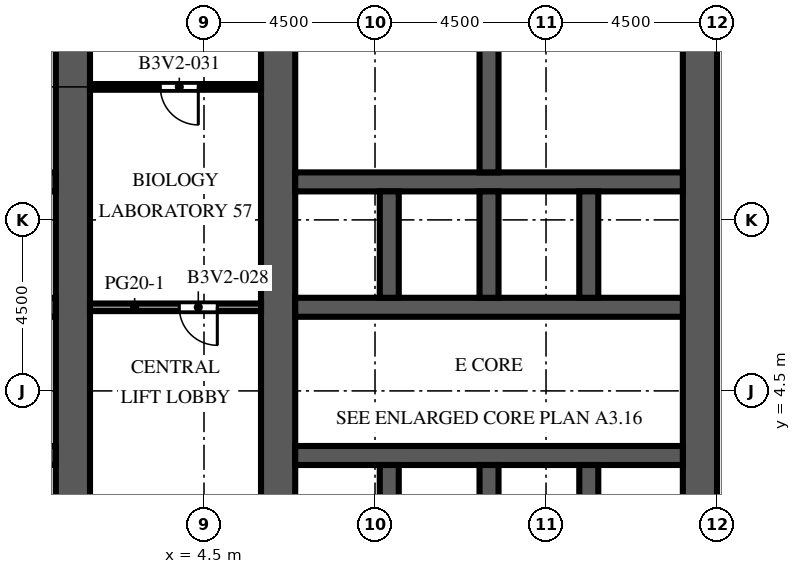
"""IFC4 building model, lengths in metres.
Left out: names, types, materials, properties, quantities, classifications, styles, units other than length and angle.
Written with IfcOpenShell. Run it as: python <this file> out.ifc"""

import sys

from ifc_helpers import new_model, si_unit, direction, frame, frame_2d, origin, place, context, subcontext, project, spatial, rectangle, extrude, element, fill, save


model = new_model("IFC4")
c1 = context("Model", 3, precision=1e-05, world=origin(), true_north=direction((0.0, 1.0)))
c2 = subcontext(c1, "Body", "Model", "MODEL_VIEW")
j1 = project(units=[si_unit("LENGTHUNIT", "METRE"), si_unit("PLANEANGLEUNIT", "RADIAN")], contexts=[c1])
p1 = place(None, origin())
s1 = spatial("IfcSite", under=j1, at=p1, CompositionType="ELEMENT")
p2 = place(p1, origin())
s2 = spatial("IfcBuilding", under=s1, at=p2, CompositionType="ELEMENT")
p3 = place(p2, frame((0.0, 0.0, 102.5)))
s3 = spatial("IfcBuildingStorey", under=s2, at=p3, CompositionType="ELEMENT", Elevation=102.5)
p4 = place(p3, frame((1.05, -9.0, 0.0), z_axis=(0.0, 0.0, 1.0), x_axis=(0.0, 1.0, 0.0)))
e1 = element("IfcWall", 1, at=p4, inside=s3, PredefinedType="SHEAR", context=c2, shape_type="SweptSolid", body=[
    extrude(rectangle(XDim=27.5, YDim=0.9, at=frame_2d((13.75, 0.0))), origin(), (0.0, 0.0, 1.0), 4.1),
])
p5 = place(p4, frame((12.55, 0.0, 0.0)))
e2 = element("IfcOpeningElement", 2, at=p5, cuts=e1, PredefinedType="OPENING", context=c2, shape_type="SweptSolid", body=[
    extrude(rectangle(XDim=2.4, YDim=2.4, at=frame_2d((1.2, 1.2))), frame((0.0, 0.46, 0.0), z_axis=(0.0, -1.0, 0.0), x_axis=(1.0, 0.0, 0.0)), (0.0, 0.0, 1.0), 0.92),
])
p6 = place(p4, frame((3.893, 0.0, 0.0)))
e3 = element("IfcOpeningElement", 3, at=p6, cuts=e1, PredefinedType="OPENING", context=c2, shape_type="SweptSolid", body=[
    extrude(rectangle(XDim=0.923, YDim=2.1, at=frame_2d((0.461, 1.05))), frame((0.0, 0.46, 0.0), z_axis=(0.0, -1.0, 0.0), x_axis=(1.0, 0.0, 0.0)), (0.0, 0.0, 1.0), 0.92),
])
p7 = place(p4, frame((23.427, 0.0, 0.0)))
e4 = element("IfcOpeningElement", 4, at=p7, cuts=e1, PredefinedType="OPENING", context=c2, shape_type="SweptSolid", body=[
    extrude(rectangle(XDim=1.2, YDim=2.1, at=frame_2d((0.6, 1.05))), frame((0.0, 0.46, 0.0), z_axis=(0.0, -1.0, 0.0), x_axis=(1.0, 0.0, 0.0)), (0.0, 0.0, 1.0), 0.92),
])
p8 = place(p3, frame((-9.6, 2.8, 0.0), z_axis=(0.0, 0.0, 1.0), x_axis=(1.0, 0.0, 0.0)))
e5 = element("IfcWall", 5, at=p8, inside=s3, PredefinedType="SHEAR", context=c2, shape_type="SweptSolid", body=[
    extrude(rectangle(XDim=10.2, YDim=0.5, at=frame_2d((5.1, 0.0))), origin(), (0.0, 0.0, 1.0), 4.1),
])
p9 = place(p8, frame((0.562, 0.0, 0.0)))
e6 = element("IfcOpeningElement", 6, at=p9, cuts=e5, PredefinedType="OPENING", context=c2, shape_type="SweptSolid", body=[
    extrude(rectangle(XDim=1.1, YDim=2.1, at=frame_2d((0.55, 1.05))), frame((0.0, 0.26, 0.0), z_axis=(0.0, -1.0, 0.0), x_axis=(1.0, 0.0, 0.0)), (0.0, 0.0, 1.0), 0.52),
])
p10 = place(p8, frame((3.238, 0.0, 0.0)))
e7 = element("IfcOpeningElement", 7, at=p10, cuts=e5, PredefinedType="OPENING", context=c2, shape_type="SweptSolid", body=[
    extrude(rectangle(XDim=1.1, YDim=2.1, at=frame_2d((0.55, 1.05))), frame((0.0, 0.26, 0.0), z_axis=(0.0, -1.0, 0.0), x_axis=(1.0, 0.0, 0.0)), (0.0, 0.0, 1.0), 0.52),
])
p11 = place(p8, frame((8.538, 0.0, 0.0)))
e8 = element("IfcOpeningElement", 8, at=p11, cuts=e5, PredefinedType="OPENING", context=c2, shape_type="SweptSolid", body=[
    extrude(rectangle(XDim=1.1, YDim=2.1, at=frame_2d((0.55, 1.05))), frame((0.0, 0.26, 0.0), z_axis=(0.0, -1.0, 0.0), x_axis=(1.0, 0.0, 0.0)), (0.0, 0.0, 1.0), 0.52),
])
p12 = place(p3, frame((-9.6, 6.7, 0.0), z_axis=(0.0, 0.0, 1.0), x_axis=(1.0, 0.0, 0.0)))
e9 = element("IfcWall", 9, at=p12, inside=s3, PredefinedType="SHEAR", context=c2, shape_type="SweptSolid", body=[
    extrude(rectangle(XDim=10.2, YDim=0.5, at=frame_2d((5.1, 0.0))), origin(), (0.0, 0.0, 1.0), 4.1),
])
p13 = place(p12, frame((0.562, 0.0, 0.0)))
e10 = element("IfcOpeningElement", 10, at=p13, cuts=e9, PredefinedType="OPENING", context=c2, shape_type="SweptSolid", body=[
    extrude(rectangle(XDim=1.1, YDim=2.1, at=frame_2d((0.55, 1.05))), frame((0.0, 0.26, 0.0), z_axis=(0.0, -1.0, 0.0), x_axis=(1.0, 0.0, 0.0)), (0.0, 0.0, 1.0), 0.52),
])
p14 = place(p12, frame((3.288, 0.0, 0.0)))
e11 = element("IfcOpeningElement", 11, at=p14, cuts=e9, PredefinedType="OPENING", context=c2, shape_type="SweptSolid", body=[
    extrude(rectangle(XDim=1.0, YDim=2.1, at=frame_2d((0.5, 1.05))), frame((0.0, 0.26, 0.0), z_axis=(0.0, -1.0, 0.0), x_axis=(1.0, 0.0, 0.0)), (0.0, 0.0, 1.0), 0.52),
])
p15 = place(p12, frame((5.913, 0.0, 0.0)))
e12 = element("IfcOpeningElement", 12, at=p15, cuts=e9, PredefinedType="OPENING", context=c2, shape_type="SweptSolid", body=[
    extrude(rectangle(XDim=1.0, YDim=2.1, at=frame_2d((0.5, 1.05))), frame((0.0, 0.26, 0.0), z_axis=(0.0, -1.0, 0.0), x_axis=(1.0, 0.0, 0.0)), (0.0, 0.0, 1.0), 0.52),
])
p16 = place(p12, frame((8.587, 0.0, 0.0)))
e13 = element("IfcOpeningElement", 13, at=p16, cuts=e9, PredefinedType="OPENING", context=c2, shape_type="SweptSolid", body=[
    extrude(rectangle(XDim=1.0, YDim=2.1, at=frame_2d((0.5, 1.05))), frame((0.0, 0.26, 0.0), z_axis=(0.0, -1.0, 0.0), x_axis=(1.0, 0.0, 0.0)), (0.0, 0.0, 1.0), 0.52),
])
p17 = place(p3, frame((-9.6, 10.0, 0.0), z_axis=(0.0, 0.0, 1.0), x_axis=(1.0, 0.0, 0.0)))
e14 = element("IfcWall", 14, at=p17, inside=s3, PredefinedType="SHEAR", context=c2, shape_type="SweptSolid", body=[
    extrude(rectangle(XDim=10.2, YDim=0.5, at=frame_2d((5.1, 0.0))), origin(), (0.0, 0.0, 1.0), 4.1),
])
p18 = place(p3, frame((6.45, -9.0, 0.0), z_axis=(0.0, 0.0, 1.0), x_axis=(0.0, 1.0, 0.0)))
e15 = element("IfcWall", 15, at=p18, inside=s3, PredefinedType="SHEAR", context=c2, shape_type="SweptSolid", body=[
    extrude(rectangle(XDim=27.5, YDim=0.9, at=frame_2d((13.75, 0.0))), origin(), (0.0, 0.0, 1.0), 4.1),
])
p19 = place(p18, frame((12.55, 0.0, 0.0)))
e16 = element("IfcOpeningElement", 16, at=p19, cuts=e15, PredefinedType="OPENING", context=c2, shape_type="SweptSolid", body=[
    extrude(rectangle(XDim=2.4, YDim=2.4, at=frame_2d((1.2, 1.2))), frame((0.0, 0.46, 0.0), z_axis=(0.0, -1.0, 0.0), x_axis=(1.0, 0.0, 0.0)), (0.0, 0.0, 1.0), 0.92),
])
p20 = place(p18, frame((3.893, 0.0, 0.0)))
e17 = element("IfcOpeningElement", 17, at=p20, cuts=e15, PredefinedType="OPENING", context=c2, shape_type="SweptSolid", body=[
    extrude(rectangle(XDim=0.923, YDim=2.1, at=frame_2d((0.461, 1.05))), frame((0.0, 0.46, 0.0), z_axis=(0.0, -1.0, 0.0), x_axis=(1.0, 0.0, 0.0)), (0.0, 0.0, 1.0), 0.92),
])
p21 = place(p18, frame((23.427, 0.0, 0.0)))
e18 = element("IfcOpeningElement", 18, at=p21, cuts=e15, PredefinedType="OPENING", context=c2, shape_type="SweptSolid", body=[
    extrude(rectangle(XDim=1.2, YDim=2.1, at=frame_2d((0.6, 1.05))), frame((0.0, 0.46, 0.0), z_axis=(0.0, -1.0, 0.0), x_axis=(1.0, 0.0, 0.0)), (0.0, 0.0, 1.0), 0.92),
])
p22 = place(p3, frame((17.55, -9.0, 0.0), z_axis=(0.0, 0.0, 1.0), x_axis=(0.0, 1.0, 0.0)))
e19 = element("IfcWall", 19, at=p22, inside=s3, PredefinedType="SHEAR", context=c2, shape_type="SweptSolid", body=[
    extrude(rectangle(XDim=27.5, YDim=0.9, at=frame_2d((13.75, 0.0))), origin(), (0.0, 0.0, 1.0), 4.1),
])
p23 = place(p22, frame((12.55, 0.0, 0.0)))
e20 = element("IfcOpeningElement", 20, at=p23, cuts=e19, PredefinedType="OPENING", context=c2, shape_type="SweptSolid", body=[
    extrude(rectangle(XDim=2.4, YDim=2.4, at=frame_2d((1.2, 1.2))), frame((0.0, 0.46, 0.0), z_axis=(0.0, -1.0, 0.0), x_axis=(1.0, 0.0, 0.0)), (0.0, 0.0, 1.0), 0.92),
])
p24 = place(p22, frame((6.825, 0.0, 0.0)))
e21 = element("IfcOpeningElement", 21, at=p24, cuts=e19, PredefinedType="OPENING", context=c2, shape_type="SweptSolid", body=[
    extrude(rectangle(XDim=1.2, YDim=2.1, at=frame_2d((0.6, 1.05))), frame((0.0, 0.46, 0.0), z_axis=(0.0, -1.0, 0.0), x_axis=(1.0, 0.0, 0.0)), (0.0, 0.0, 1.0), 0.92),
])
p25 = place(p22, frame((19.475, 0.0, 0.0)))
e22 = element("IfcOpeningElement", 22, at=p25, cuts=e19, PredefinedType="OPENING", context=c2, shape_type="SweptSolid", body=[
    extrude(rectangle(XDim=1.2, YDim=2.1, at=frame_2d((0.6, 1.05))), frame((0.0, 0.46, 0.0), z_axis=(0.0, -1.0, 0.0), x_axis=(1.0, 0.0, 0.0)), (0.0, 0.0, 1.0), 0.92),
])
p26 = place(p3, frame((6.9, 2.8, 0.0), z_axis=(0.0, 0.0, 1.0), x_axis=(1.0, 0.0, 0.0)))
e23 = element("IfcWall", 23, at=p26, inside=s3, PredefinedType="SHEAR", context=c2, shape_type="SweptSolid", body=[
    extrude(rectangle(XDim=10.2, YDim=0.5, at=frame_2d((5.1, 0.0))), origin(), (0.0, 0.0, 1.0), 4.1),
])
p27 = place(p26, frame((0.562, 0.0, 0.0)))
e24 = element("IfcOpeningElement", 24, at=p27, cuts=e23, PredefinedType="OPENING", context=c2, shape_type="SweptSolid", body=[
    extrude(rectangle(XDim=1.1, YDim=2.1, at=frame_2d((0.55, 1.05))), frame((0.0, 0.26, 0.0), z_axis=(0.0, -1.0, 0.0), x_axis=(1.0, 0.0, 0.0)), (0.0, 0.0, 1.0), 0.52),
])
p28 = place(p26, frame((3.238, 0.0, 0.0)))
e25 = element("IfcOpeningElement", 25, at=p28, cuts=e23, PredefinedType="OPENING", context=c2, shape_type="SweptSolid", body=[
    extrude(rectangle(XDim=1.1, YDim=2.1, at=frame_2d((0.55, 1.05))), frame((0.0, 0.26, 0.0), z_axis=(0.0, -1.0, 0.0), x_axis=(1.0, 0.0, 0.0)), (0.0, 0.0, 1.0), 0.52),
])
p29 = place(p26, frame((8.538, 0.0, 0.0)))
e26 = element("IfcOpeningElement", 26, at=p29, cuts=e23, PredefinedType="OPENING", context=c2, shape_type="SweptSolid", body=[
    extrude(rectangle(XDim=1.1, YDim=2.1, at=frame_2d((0.55, 1.05))), frame((0.0, 0.26, 0.0), z_axis=(0.0, -1.0, 0.0), x_axis=(1.0, 0.0, 0.0)), (0.0, 0.0, 1.0), 0.52),
])
p30 = place(p3, frame((6.9, 6.7, 0.0), z_axis=(0.0, 0.0, 1.0), x_axis=(1.0, 0.0, 0.0)))
e27 = element("IfcWall", 27, at=p30, inside=s3, PredefinedType="SHEAR", context=c2, shape_type="SweptSolid", body=[
    extrude(rectangle(XDim=10.2, YDim=0.5, at=frame_2d((5.1, 0.0))), origin(), (0.0, 0.0, 1.0), 4.1),
])
p31 = place(p30, frame((0.562, 0.0, 0.0)))
e28 = element("IfcOpeningElement", 28, at=p31, cuts=e27, PredefinedType="OPENING", context=c2, shape_type="SweptSolid", body=[
    extrude(rectangle(XDim=1.1, YDim=2.1, at=frame_2d((0.55, 1.05))), frame((0.0, 0.26, 0.0), z_axis=(0.0, -1.0, 0.0), x_axis=(1.0, 0.0, 0.0)), (0.0, 0.0, 1.0), 0.52),
])
p32 = place(p30, frame((3.288, 0.0, 0.0)))
e29 = element("IfcOpeningElement", 29, at=p32, cuts=e27, PredefinedType="OPENING", context=c2, shape_type="SweptSolid", body=[
    extrude(rectangle(XDim=1.0, YDim=2.1, at=frame_2d((0.5, 1.05))), frame((0.0, 0.26, 0.0), z_axis=(0.0, -1.0, 0.0), x_axis=(1.0, 0.0, 0.0)), (0.0, 0.0, 1.0), 0.52),
])
p33 = place(p30, frame((5.913, 0.0, 0.0)))
e30 = element("IfcOpeningElement", 30, at=p33, cuts=e27, PredefinedType="OPENING", context=c2, shape_type="SweptSolid", body=[
    extrude(rectangle(XDim=1.0, YDim=2.1, at=frame_2d((0.5, 1.05))), frame((0.0, 0.26, 0.0), z_axis=(0.0, -1.0, 0.0), x_axis=(1.0, 0.0, 0.0)), (0.0, 0.0, 1.0), 0.52),
])
p34 = place(p30, frame((8.587, 0.0, 0.0)))
e31 = element("IfcOpeningElement", 31, at=p34, cuts=e27, PredefinedType="OPENING", context=c2, shape_type="SweptSolid", body=[
    extrude(rectangle(XDim=1.0, YDim=2.1, at=frame_2d((0.5, 1.05))), frame((0.0, 0.26, 0.0), z_axis=(0.0, -1.0, 0.0), x_axis=(1.0, 0.0, 0.0)), (0.0, 0.0, 1.0), 0.52),
])
p35 = place(p3, frame((6.9, 10.0, 0.0), z_axis=(0.0, 0.0, 1.0), x_axis=(1.0, 0.0, 0.0)))
e32 = element("IfcWall", 32, at=p35, inside=s3, PredefinedType="SHEAR", context=c2, shape_type="SweptSolid", body=[
    extrude(rectangle(XDim=10.2, YDim=0.5, at=frame_2d((5.1, 0.0))), origin(), (0.0, 0.0, 1.0), 4.1),
])
for number, where, z_axis, x_axis in (
    (33, (9.375, -0.25, 0.0), (0.0, 0.0, 1.0), (0.0, 1.0, 0.0)),
    (34, (9.375, 6.95, 0.0), (0.0, 0.0, 1.0), (0.0, 1.0, 0.0)),
    (35, (12.0, -0.25, 0.0), (0.0, 0.0, 1.0), (0.0, 1.0, 0.0)),
    (36, (12.0, 6.95, 0.0), (0.0, 0.0, 1.0), (0.0, 1.0, 0.0)),
    (37, (14.625, -0.25, 0.0), (0.0, 0.0, 1.0), (0.0, 1.0, 0.0)),
    (38, (14.625, 6.95, 0.0), (0.0, 0.0, 1.0), (0.0, 1.0, 0.0)),
):
    element("IfcWall", number, at=place(p3, frame(where, z_axis=z_axis, x_axis=x_axis)), inside=s3, PredefinedType="SHEAR", context=c2, shape_type="SweptSolid", body=[
        extrude(rectangle(XDim=2.8, YDim=0.5, at=frame_2d((1.4, 0.0))), origin(), (0.0, 0.0, 1.0), 4.1),
    ])
p36 = place(p3, frame((12.0, 10.25, 0.0), z_axis=(0.0, 0.0, 1.0), x_axis=(0.0, 1.0, 0.0)))
e39 = element("IfcWall", 39, at=p36, inside=s3, PredefinedType="SHEAR", context=c2, shape_type="SweptSolid", body=[
    extrude(rectangle(XDim=7.35, YDim=0.5, at=frame_2d((3.675, 0.0))), origin(), (0.0, 0.0, 1.0), 4.1),
])
p37 = place(p3, frame((-0.7, 12.455, 0.0), z_axis=(0.0, 0.0, 1.0), x_axis=(1.0, 0.0, 0.0)))
e40 = element("IfcWall", 40, at=p37, inside=s3, PredefinedType="PARTITIONING", context=c2, shape_type="SweptSolid", body=[
    extrude(rectangle(XDim=1.3, YDim=0.1, at=frame_2d((0.65, 0.0))), origin(), (0.0, 0.0, 1.0), 3.65),
])
p38 = place(p37, frame((0.2, 0.0, 0.0)))
e41 = element("IfcOpeningElement", 41, at=p38, cuts=e40, PredefinedType="OPENING", context=c2, shape_type="SweptSolid", body=[
    extrude(rectangle(XDim=0.9, YDim=2.1, at=frame_2d((0.45, 1.05))), frame((0.0, 0.06, 0.0), z_axis=(0.0, -1.0, 0.0), x_axis=(1.0, 0.0, 0.0)), (0.0, 0.0, 1.0), 0.12),
])
p39 = place(p3, frame((6.9, 12.455, 0.0), z_axis=(0.0, 0.0, 1.0), x_axis=(1.0, 0.0, 0.0)))
e42 = element("IfcWall", 42, at=p39, inside=s3, PredefinedType="PARTITIONING", context=c2, shape_type="SweptSolid", body=[
    extrude(rectangle(XDim=1.3, YDim=0.1, at=frame_2d((0.65, 0.0))), origin(), (0.0, 0.0, 1.0), 3.65),
])
p40 = place(p39, frame((0.2, 0.0, 0.0)))
e43 = element("IfcOpeningElement", 43, at=p40, cuts=e42, PredefinedType="OPENING", context=c2, shape_type="SweptSolid", body=[
    extrude(rectangle(XDim=0.9, YDim=2.1, at=frame_2d((0.45, 1.05))), frame((0.0, 0.06, 0.0), z_axis=(0.0, -1.0, 0.0), x_axis=(1.0, 0.0, 0.0)), (0.0, 0.0, 1.0), 0.12),
])
p41 = place(p3, frame((8.2, 12.455, 0.0), z_axis=(0.0, 0.0, 1.0), x_axis=(1.0, 0.0, 0.0)))
e44 = element("IfcWall", 44, at=p41, inside=s3, PredefinedType="PARTITIONING", context=c2, shape_type="SweptSolid", body=[
    extrude(rectangle(XDim=3.55, YDim=0.1, at=frame_2d((1.775, 0.0))), origin(), (0.0, 0.0, 1.0), 3.65),
])
p42 = place(p3, frame((8.2, 12.455, 0.0), z_axis=(0.0, 0.0, 1.0), x_axis=(0.0, 1.0, 0.0)))
e45 = element("IfcWall", 45, at=p42, inside=s3, PredefinedType="PARTITIONING", context=c2, shape_type="SweptSolid", body=[
    extrude(rectangle(XDim=2.573, YDim=0.1, at=frame_2d((1.286, 0.0))), origin(), (0.0, 0.0, 1.0), 3.65),
])
p43 = place(p42, frame((0.786, 0.0, 0.0)))
e46 = element("IfcOpeningElement", 46, at=p43, cuts=e45, PredefinedType="OPENING", context=c2, shape_type="SweptSolid", body=[
    extrude(rectangle(XDim=1.0, YDim=2.1, at=frame_2d((0.5, 1.05))), frame((0.0, 0.06, 0.0), z_axis=(0.0, -1.0, 0.0), x_axis=(1.0, 0.0, 0.0)), (0.0, 0.0, 1.0), 0.12),
])
p44 = place(p3, frame((1.5, 6.7, 0.0), z_axis=(0.0, 0.0, 1.0), x_axis=(1.0, 0.0, 0.0)))
e47 = element("IfcWall", 47, at=p44, inside=s3, PredefinedType="PARTITIONING", context=c2, shape_type="SweptSolid", body=[
    extrude(rectangle(XDim=4.5, YDim=0.2, at=frame_2d((2.25, 0.0))), origin(), (0.0, 0.0, 1.0), 3.65),
])
p45 = place(p44, frame((2.35, 0.0, 0.0)))
e48 = element("IfcOpeningElement", 48, at=p45, cuts=e47, PredefinedType="OPENING", context=c2, shape_type="SweptSolid", body=[
    extrude(rectangle(XDim=1.0, YDim=2.1, at=frame_2d((0.5, 1.05))), frame((0.0, 0.11, 0.0), z_axis=(0.0, -1.0, 0.0), x_axis=(1.0, 0.0, 0.0)), (0.0, 0.0, 1.0), 0.22),
])
p46 = place(p3, frame((1.5, 12.5, 0.0), z_axis=(0.0, 0.0, 1.0), x_axis=(1.0, 0.0, 0.0)))
e49 = element("IfcWall", 49, at=p46, inside=s3, PredefinedType="PARTITIONING", context=c2, shape_type="SweptSolid", body=[
    extrude(rectangle(XDim=4.5, YDim=0.15, at=frame_2d((2.25, 0.0))), origin(), (0.0, 0.0, 1.0), 3.65),
])
p47 = place(p46, frame((1.85, 0.0, 0.0)))
e50 = element("IfcOpeningElement", 50, at=p47, cuts=e49, PredefinedType="OPENING", context=c2, shape_type="SweptSolid", body=[
    extrude(rectangle(XDim=1.0, YDim=2.1, at=frame_2d((0.5, 1.05))), frame((0.0, 0.085, 0.0), z_axis=(0.0, -1.0, 0.0), x_axis=(1.0, 0.0, 0.0)), (0.0, 0.0, 1.0), 0.17),
])
p48 = place(p27, origin())
e51 = element("IfcDoor", 51, at=p48, inside=s3, OperationType="DOUBLE_DOOR_SLIDING", PredefinedType="DOOR", context=c2, shape_type="SweptSolid", body=[
    extrude(rectangle(XDim=1.1, YDim=2.1, at=frame_2d((0.55, 1.05))), frame((0.0, 0.025, 0.0), z_axis=(0.0, -1.0, 0.0), x_axis=(1.0, 0.0, 0.0)), (0.0, 0.0, 1.0), 0.05),
])
fill(e24, e51)
p49 = place(p28, origin())
e52 = element("IfcDoor", 52, at=p49, inside=s3, OperationType="DOUBLE_DOOR_SLIDING", PredefinedType="DOOR", context=c2, shape_type="SweptSolid", body=[
    extrude(rectangle(XDim=1.1, YDim=2.1, at=frame_2d((0.55, 1.05))), frame((0.0, 0.025, 0.0), z_axis=(0.0, -1.0, 0.0), x_axis=(1.0, 0.0, 0.0)), (0.0, 0.0, 1.0), 0.05),
])
fill(e25, e52)
p50 = place(p29, origin())
e53 = element("IfcDoor", 53, at=p50, inside=s3, OperationType="DOUBLE_DOOR_SLIDING", PredefinedType="DOOR", context=c2, shape_type="SweptSolid", body=[
    extrude(rectangle(XDim=1.1, YDim=2.1, at=frame_2d((0.55, 1.05))), frame((0.0, 0.025, 0.0), z_axis=(0.0, -1.0, 0.0), x_axis=(1.0, 0.0, 0.0)), (0.0, 0.0, 1.0), 0.05),
])
fill(e26, e53)
p51 = place(p31, origin())
e54 = element("IfcDoor", 54, at=p51, inside=s3, OperationType="DOUBLE_DOOR_SLIDING", PredefinedType="DOOR", context=c2, shape_type="SweptSolid", body=[
    extrude(rectangle(XDim=1.1, YDim=2.1, at=frame_2d((0.55, 1.05))), frame((0.0, 0.025, 0.0), z_axis=(0.0, -1.0, 0.0), x_axis=(1.0, 0.0, 0.0)), (0.0, 0.0, 1.0), 0.05),
])
fill(e28, e54)
p52 = place(p5, origin())
e55 = element("IfcDoor", 55, at=p52, inside=s3, OperationType="DOUBLE_DOOR_DOUBLE_SWING", PredefinedType="DOOR", context=c2, shape_type="SweptSolid", body=[
    extrude(rectangle(XDim=2.4, YDim=2.4, at=frame_2d((1.2, 1.2))), frame((0.0, 0.025, 0.0), z_axis=(0.0, -1.0, 0.0), x_axis=(1.0, 0.0, 0.0)), (0.0, 0.0, 1.0), 0.05),
])
fill(e2, e55)
p53 = place(p19, origin())
e56 = element("IfcDoor", 56, at=p53, inside=s3, OperationType="DOUBLE_DOOR_DOUBLE_SWING", PredefinedType="DOOR", context=c2, shape_type="SweptSolid", body=[
    extrude(rectangle(XDim=2.4, YDim=2.4, at=frame_2d((1.2, 1.2))), frame((0.0, 0.025, 0.0), z_axis=(0.0, -1.0, 0.0), x_axis=(1.0, 0.0, 0.0)), (0.0, 0.0, 1.0), 0.05),
])
fill(e16, e56)
p54 = place(p23, origin())
e57 = element("IfcDoor", 57, at=p54, inside=s3, OperationType="DOUBLE_DOOR_DOUBLE_SWING", PredefinedType="DOOR", context=c2, shape_type="SweptSolid", body=[
    extrude(rectangle(XDim=2.4, YDim=2.4, at=frame_2d((1.2, 1.2))), frame((0.0, 0.025, 0.0), z_axis=(0.0, -1.0, 0.0), x_axis=(1.0, 0.0, 0.0)), (0.0, 0.0, 1.0), 0.05),
])
fill(e20, e57)
p55 = place(p25, frame((1.2, 0.0, 0.0), z_axis=(0.0, 0.0, 1.0), x_axis=(-1.0, 0.0, 0.0)))
e58 = element("IfcDoor", 58, at=p55, inside=s3, OperationType="SINGLE_SWING_LEFT", PredefinedType="DOOR", context=c2, shape_type="SweptSolid", body=[
    extrude(rectangle(XDim=1.2, YDim=2.1, at=frame_2d((0.6, 1.05))), frame((0.0, 0.025, 0.0), z_axis=(0.0, -1.0, 0.0), x_axis=(1.0, 0.0, 0.0)), (0.0, 0.0, 1.0), 0.05),
])
fill(e22, e58)
p56 = place(p32, origin())
e59 = element("IfcDoor", 59, at=p56, inside=s3, OperationType="SINGLE_SWING_RIGHT", PredefinedType="DOOR", context=c2, shape_type="SweptSolid", body=[
    extrude(rectangle(XDim=1.0, YDim=2.1, at=frame_2d((0.5, 1.05))), frame((0.0, 0.025, 0.0), z_axis=(0.0, -1.0, 0.0), x_axis=(1.0, 0.0, 0.0)), (0.0, 0.0, 1.0), 0.05),
])
fill(e29, e59)
p57 = place(p33, origin())
e60 = element("IfcDoor", 60, at=p57, inside=s3, OperationType="SINGLE_SWING_LEFT", PredefinedType="DOOR", context=c2, shape_type="SweptSolid", body=[
    extrude(rectangle(XDim=1.0, YDim=2.1, at=frame_2d((0.5, 1.05))), frame((0.0, 0.025, 0.0), z_axis=(0.0, -1.0, 0.0), x_axis=(1.0, 0.0, 0.0)), (0.0, 0.0, 1.0), 0.05),
])
fill(e30, e60)
p58 = place(p34, origin())
e61 = element("IfcDoor", 61, at=p58, inside=s3, OperationType="SINGLE_SWING_RIGHT", PredefinedType="DOOR", context=c2, shape_type="SweptSolid", body=[
    extrude(rectangle(XDim=1.0, YDim=2.1, at=frame_2d((0.5, 1.05))), frame((0.0, 0.025, 0.0), z_axis=(0.0, -1.0, 0.0), x_axis=(1.0, 0.0, 0.0)), (0.0, 0.0, 1.0), 0.05),
])
fill(e31, e61)
p59 = place(p40, origin())
e62 = element("IfcDoor", 62, at=p59, inside=s3, OperationType="SINGLE_SWING_RIGHT", PredefinedType="DOOR", context=c2, shape_type="SweptSolid", body=[
    extrude(rectangle(XDim=0.9, YDim=2.1, at=frame_2d((0.45, 1.05))), frame((0.0, 0.025, 0.0), z_axis=(0.0, -1.0, 0.0), x_axis=(1.0, 0.0, 0.0)), (0.0, 0.0, 1.0), 0.05),
])
fill(e43, e62)
p60 = place(p43, origin())
e63 = element("IfcDoor", 63, at=p60, inside=s3, OperationType="SINGLE_SWING_RIGHT", PredefinedType="DOOR", context=c2, shape_type="SweptSolid", body=[
    extrude(rectangle(XDim=1.0, YDim=2.1, at=frame_2d((0.5, 1.05))), frame((0.0, 0.025, 0.0), z_axis=(0.0, -1.0, 0.0), x_axis=(1.0, 0.0, 0.0)), (0.0, 0.0, 1.0), 0.05),
])
fill(e46, e63)
p61 = place(p45, origin())
e64 = element("IfcDoor", 64, at=p61, inside=s3, OperationType="SINGLE_SWING_RIGHT", PredefinedType="DOOR", context=c2, shape_type="SweptSolid", body=[
    extrude(rectangle(XDim=1.0, YDim=2.1, at=frame_2d((0.5, 1.05))), frame((0.0, 0.025, 0.0), z_axis=(0.0, -1.0, 0.0), x_axis=(1.0, 0.0, 0.0)), (0.0, 0.0, 1.0), 0.05),
])
fill(e48, e64)
p62 = place(p47, origin())
e65 = element("IfcDoor", 65, at=p62, inside=s3, OperationType="SINGLE_SWING_RIGHT", PredefinedType="DOOR", context=c2, shape_type="SweptSolid", body=[
    extrude(rectangle(XDim=1.0, YDim=2.1, at=frame_2d((0.5, 1.05))), frame((0.0, 0.025, 0.0), z_axis=(0.0, -1.0, 0.0), x_axis=(1.0, 0.0, 0.0)), (0.0, 0.0, 1.0), 0.05),
])
fill(e50, e65)
save(model, sys.argv[1])
